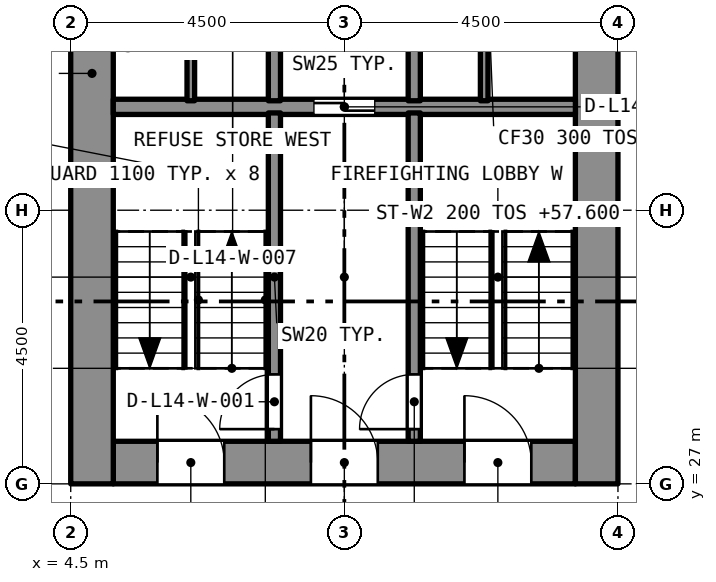
"""IFC4 building model, lengths in metres.
Left out: names, types, materials, properties, quantities, classifications, styles, units other than length and angle.
Written with IfcOpenShell. Run it as: python <this file> out.ifc"""

import sys

from ifc_helpers import new_model, si_unit, direction, frame, frame_2d, origin, place, context, subcontext, project, spatial, rectangle, extrude, element, fill, save


model = new_model("IFC4")
c1 = context("Model", 3, precision=1e-05, world=origin(), true_north=direction((0.0, 1.0)))
c2 = subcontext(c1, "Body", "Model", "MODEL_VIEW")
j1 = project(units=[si_unit("LENGTHUNIT", "METRE"), si_unit("PLANEANGLEUNIT", "RADIAN")], contexts=[c1])
p1 = place(None, origin())
s1 = spatial("IfcSite", under=j1, at=p1, CompositionType="ELEMENT")
p2 = place(p1, origin())
s2 = spatial("IfcBuilding", under=s1, at=p2, CompositionType="ELEMENT")
p3 = place(p2, frame((0.0, 0.0, 56.0)))
s3 = spatial("IfcBuildingStorey", under=s2, at=p3, CompositionType="ELEMENT", Elevation=56.0)
p4 = place(p3, frame((5.2, 27.35, 0.0), z_axis=(0.0, 0.0, 1.0), x_axis=(1.0, 0.0, 0.0)))
e1 = element("IfcWall", 1, at=p4, inside=s3, PredefinedType="SOLIDWALL", context=c2, shape_type="SweptSolid", body=[
    extrude(rectangle(XDim=7.6, YDim=0.7, at=frame_2d((3.8, 0.0))), origin(), (0.0, 0.0, 1.0), 3.2),
])
p5 = place(p4, frame((0.725, 0.0, 0.0)))
e2 = element("IfcOpeningElement", 2, at=p5, cuts=e1, PredefinedType="OPENING", context=c2, shape_type="SweptSolid", body=[
    extrude(rectangle(XDim=1.1, YDim=2.1, at=frame_2d((0.55, 1.05))), frame((0.0, 0.36, 0.0), z_axis=(0.0, -1.0, 0.0), x_axis=(1.0, 0.0, 0.0)), (0.0, 0.0, 1.0), 0.72),
])
p6 = place(p4, frame((3.25, 0.0, 0.0)))
e3 = element("IfcOpeningElement", 3, at=p6, cuts=e1, PredefinedType="OPENING", context=c2, shape_type="SweptSolid", body=[
    extrude(rectangle(XDim=1.1, YDim=2.1, at=frame_2d((0.55, 1.05))), frame((0.0, 0.36, 0.0), z_axis=(0.0, -1.0, 0.0), x_axis=(1.0, 0.0, 0.0)), (0.0, 0.0, 1.0), 0.72),
])
p7 = place(p4, frame((5.775, 0.0, 0.0)))
e4 = element("IfcOpeningElement", 4, at=p7, cuts=e1, PredefinedType="OPENING", context=c2, shape_type="SweptSolid", body=[
    extrude(rectangle(XDim=1.1, YDim=2.1, at=frame_2d((0.55, 1.05))), frame((0.0, 0.36, 0.0), z_axis=(0.0, -1.0, 0.0), x_axis=(1.0, 0.0, 0.0)), (0.0, 0.0, 1.0), 0.72),
])
p8 = place(p3, frame((4.85, 27.0, 0.0), z_axis=(0.0, 0.0, 1.0), x_axis=(0.0, 1.0, 0.0)))
e5 = element("IfcWall", 5, at=p8, inside=s3, PredefinedType="SOLIDWALL", context=c2, shape_type="SweptSolid", body=[
    extrude(rectangle(XDim=13.5, YDim=0.7, at=frame_2d((6.75, 0.0))), origin(), (0.0, 0.0, 1.0), 3.2),
])
p9 = place(p8, frame((8.95, 0.0, 0.0)))
e6 = element("IfcOpeningElement", 6, at=p9, cuts=e5, PredefinedType="OPENING", context=c2, shape_type="SweptSolid", body=[
    extrude(rectangle(XDim=1.2, YDim=2.1, at=frame_2d((0.6, 1.05))), frame((0.0, 0.36, 0.0), z_axis=(0.0, -1.0, 0.0), x_axis=(1.0, 0.0, 0.0)), (0.0, 0.0, 1.0), 0.72),
])
p10 = place(p3, frame((13.15, 27.0, 0.0), z_axis=(0.0, 0.0, 1.0), x_axis=(0.0, 1.0, 0.0)))
e7 = element("IfcWall", 7, at=p10, inside=s3, PredefinedType="SOLIDWALL", context=c2, shape_type="SweptSolid", body=[
    extrude(rectangle(XDim=13.5, YDim=0.7, at=frame_2d((6.75, 0.0))), origin(), (0.0, 0.0, 1.0), 3.2),
])
p11 = place(p10, frame((11.1, 0.0, 0.0)))
e8 = element("IfcOpeningElement", 8, at=p11, cuts=e7, PredefinedType="OPENING", context=c2, shape_type="SweptSolid", body=[
    extrude(rectangle(XDim=1.1, YDim=2.1, at=frame_2d((0.55, 1.05))), frame((0.0, 0.36, 0.0), z_axis=(0.0, -1.0, 0.0), x_axis=(1.0, 0.0, 0.0)), (0.0, 0.0, 1.0), 0.72),
])
p12 = place(p10, frame((8.95, 0.0, 0.0)))
e9 = element("IfcOpeningElement", 9, at=p12, cuts=e7, PredefinedType="OPENING", context=c2, shape_type="SweptSolid", body=[
    extrude(rectangle(XDim=1.2, YDim=2.1, at=frame_2d((0.6, 1.05))), frame((0.0, 0.36, 0.0), z_axis=(0.0, -1.0, 0.0), x_axis=(1.0, 0.0, 0.0)), (0.0, 0.0, 1.0), 0.72),
])
p13 = place(p3, frame((5.2, 33.2, 0.0), z_axis=(0.0, 0.0, 1.0), x_axis=(1.0, 0.0, 0.0)))
e10 = element("IfcWall", 10, at=p13, inside=s3, PredefinedType="SOLIDWALL", context=c2, shape_type="SweptSolid", body=[
    extrude(rectangle(XDim=7.6, YDim=0.25, at=frame_2d((3.8, 0.0))), origin(), (0.0, 0.0, 1.0), 2.9),
])
p14 = place(p13, frame((3.3, 0.0, 0.0)))
e11 = element("IfcOpeningElement", 11, at=p14, cuts=e10, PredefinedType="OPENING", context=c2, shape_type="SweptSolid", body=[
    extrude(rectangle(XDim=1.0, YDim=2.1, at=frame_2d((0.5, 1.05))), frame((0.0, 0.135, 0.0), z_axis=(0.0, -1.0, 0.0), x_axis=(1.0, 0.0, 0.0)), (0.0, 0.0, 1.0), 0.27),
])
p15 = place(p3, frame((7.85, 27.7, 0.0), z_axis=(0.0, 0.0, 1.0), x_axis=(0.0, 1.0, 0.0)))
e12 = element("IfcWall", 12, at=p15, inside=s3, PredefinedType="SOLIDWALL", context=c2, shape_type="SweptSolid", body=[
    extrude(rectangle(XDim=5.4, YDim=0.2, at=frame_2d((2.7, 0.0))), origin(), (0.0, 0.0, 1.0), 2.9),
])
p16 = place(p15, frame((0.2, 0.0, 0.0)))
e13 = element("IfcOpeningElement", 13, at=p16, cuts=e12, PredefinedType="OPENING", context=c2, shape_type="SweptSolid", body=[
    extrude(rectangle(XDim=0.9, YDim=2.1, at=frame_2d((0.45, 1.05))), frame((0.0, 0.11, 0.0), z_axis=(0.0, -1.0, 0.0), x_axis=(1.0, 0.0, 0.0)), (0.0, 0.0, 1.0), 0.22),
])
p17 = place(p3, frame((10.15, 27.7, 0.0), z_axis=(0.0, 0.0, 1.0), x_axis=(0.0, 1.0, 0.0)))
e14 = element("IfcWall", 14, at=p17, inside=s3, PredefinedType="SOLIDWALL", context=c2, shape_type="SweptSolid", body=[
    extrude(rectangle(XDim=5.4, YDim=0.2, at=frame_2d((2.7, 0.0))), origin(), (0.0, 0.0, 1.0), 2.9),
])
p18 = place(p17, frame((0.2, 0.0, 0.0)))
e15 = element("IfcOpeningElement", 15, at=p18, cuts=e14, PredefinedType="OPENING", context=c2, shape_type="SweptSolid", body=[
    extrude(rectangle(XDim=0.9, YDim=2.1, at=frame_2d((0.45, 1.05))), frame((0.0, 0.11, 0.0), z_axis=(0.0, -1.0, 0.0), x_axis=(1.0, 0.0, 0.0)), (0.0, 0.0, 1.0), 0.22),
])
for number, where, z_axis, x_axis in (
    (16, (7.85, 33.3, 0.0), (0.0, 0.0, 1.0), (0.0, 1.0, 0.0)),
    (17, (10.15, 33.3, 0.0), (0.0, 0.0, 1.0), (0.0, 1.0, 0.0)),
):
    element("IfcWall", number, at=place(p3, frame(where, z_axis=z_axis, x_axis=x_axis)), inside=s3, PredefinedType="SOLIDWALL", context=c2, shape_type="SweptSolid", body=[
        extrude(rectangle(XDim=2.3, YDim=0.2, at=frame_2d((1.15, 0.0))), origin(), (0.0, 0.0, 1.0), 2.9),
    ])
for number, where, z_axis, x_axis in (
    (18, (6.475, 33.3, 0.0), (0.0, 0.0, 1.0), (0.0, 1.0, 0.0)),
    (19, (11.3, 33.3, 0.0), (0.0, 0.0, 1.0), (0.0, 1.0, 0.0)),
):
    element("IfcWall", number, at=place(p3, frame(where, z_axis=z_axis, x_axis=x_axis)), inside=s3, PredefinedType="PARTITIONING", context=c2, shape_type="SweptSolid", body=[
        extrude(rectangle(XDim=2.3, YDim=0.125, at=frame_2d((1.15, 0.0))), origin(), (0.0, 0.0, 1.0), 2.9),
    ])
p19 = place(p16, origin())
e20 = element("IfcDoor", 20, at=p19, inside=s3, OperationType="SINGLE_SWING_LEFT", PredefinedType="DOOR", context=c2, shape_type="SweptSolid", body=[
    extrude(rectangle(XDim=0.9, YDim=2.1, at=frame_2d((0.45, 1.05))), frame((0.0, 0.025, 0.0), z_axis=(0.0, -1.0, 0.0), x_axis=(1.0, 0.0, 0.0)), (0.0, 0.0, 1.0), 0.05),
])
fill(e13, e20)
p20 = place(p18, origin())
e21 = element("IfcDoor", 21, at=p20, inside=s3, OperationType="SINGLE_SWING_LEFT", PredefinedType="DOOR", context=c2, shape_type="SweptSolid", body=[
    extrude(rectangle(XDim=0.9, YDim=2.1, at=frame_2d((0.45, 1.05))), frame((0.0, 0.025, 0.0), z_axis=(0.0, -1.0, 0.0), x_axis=(1.0, 0.0, 0.0)), (0.0, 0.0, 1.0), 0.05),
])
fill(e15, e21)
p21 = place(p14, origin())
e22 = element("IfcDoor", 22, at=p21, inside=s3, OperationType="SLIDING_TO_LEFT", PredefinedType="DOOR", context=c2, shape_type="SweptSolid", body=[
    extrude(rectangle(XDim=1.0, YDim=2.1, at=frame_2d((0.5, 1.05))), frame((0.0, 0.025, 0.0), z_axis=(0.0, -1.0, 0.0), x_axis=(1.0, 0.0, 0.0)), (0.0, 0.0, 1.0), 0.05),
])
fill(e11, e22)
p22 = place(p5, origin())
e23 = element("IfcDoor", 23, at=p22, inside=s3, OperationType="SINGLE_SWING_LEFT", PredefinedType="DOOR", context=c2, shape_type="SweptSolid", body=[
    extrude(rectangle(XDim=1.1, YDim=2.1, at=frame_2d((0.55, 1.05))), frame((0.0, 0.025, 0.0), z_axis=(0.0, -1.0, 0.0), x_axis=(1.0, 0.0, 0.0)), (0.0, 0.0, 1.0), 0.05),
])
fill(e2, e23)
p23 = place(p6, origin())
e24 = element("IfcDoor", 24, at=p23, inside=s3, OperationType="SINGLE_SWING_LEFT", PredefinedType="DOOR", context=c2, shape_type="SweptSolid", body=[
    extrude(rectangle(XDim=1.1, YDim=2.1, at=frame_2d((0.55, 1.05))), frame((0.0, 0.025, 0.0), z_axis=(0.0, -1.0, 0.0), x_axis=(1.0, 0.0, 0.0)), (0.0, 0.0, 1.0), 0.05),
])
fill(e3, e24)
p24 = place(p7, origin())
e25 = element("IfcDoor", 25, at=p24, inside=s3, OperationType="SINGLE_SWING_LEFT", PredefinedType="DOOR", context=c2, shape_type="SweptSolid", body=[
    extrude(rectangle(XDim=1.1, YDim=2.1, at=frame_2d((0.55, 1.05))), frame((0.0, 0.025, 0.0), z_axis=(0.0, -1.0, 0.0), x_axis=(1.0, 0.0, 0.0)), (0.0, 0.0, 1.0), 0.05),
])
fill(e4, e25)
save(model, sys.argv[1])
